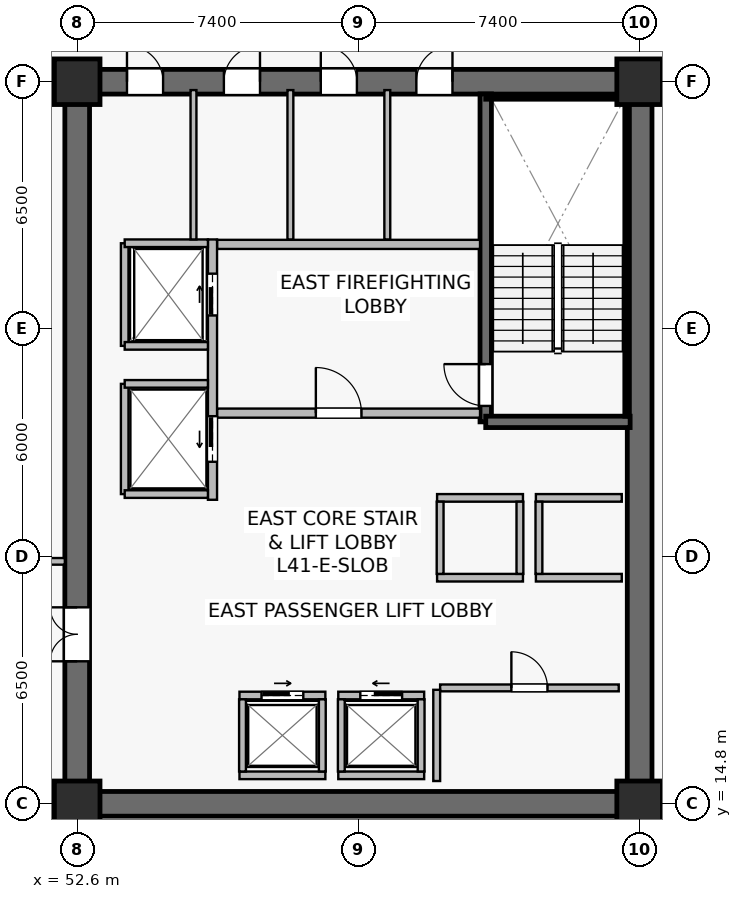
"""IFC4 building model, lengths in metres.
Left out: names, types, materials, properties, quantities, classifications, styles, units other than length and angle.
Written with IfcOpenShell. Run it as: python <this file> out.ifc"""

import sys

from ifc_helpers import new_model, si_unit, direction, frame, frame_2d, origin, origin_2d, place, context, subcontext, project, spatial, rectangle, extrude, source, transform, mapped, element, fill, save


model = new_model("IFC4")
c1 = context("Model", 3, precision=1e-05, world=origin(), true_north=direction((0.0, 1.0)))
c2 = subcontext(c1, "Body", "Model", "MODEL_VIEW")
j1 = project(units=[si_unit("LENGTHUNIT", "METRE"), si_unit("PLANEANGLEUNIT", "RADIAN")], contexts=[c1])
p1 = place(None, origin())
s1 = spatial("IfcSite", under=j1, at=p1, CompositionType="ELEMENT")
p2 = place(p1, origin())
s2 = spatial("IfcBuilding", under=s1, at=p2, CompositionType="ELEMENT")
p3 = place(p2, frame((0.0, 0.0, 170.7)))
s3 = spatial("IfcBuildingStorey", under=s2, at=p3, CompositionType="ELEMENT", Elevation=170.7)
p4 = place(p3, frame((52.275, 14.8, 0.0), z_axis=(0.0, 0.0, 1.0), x_axis=(1.0, 0.0, 0.0)))
e1 = element("IfcWall", 1, at=p4, inside=s3, PredefinedType="SHEAR", context=c2, shape_type="SweptSolid", body=[
    extrude(rectangle(XDim=15.45, YDim=0.65, at=frame_2d((7.725, 0.0))), origin(), (0.0, 0.0, 1.0), 3.79),
])
p5 = place(p3, frame((52.275, 33.8, 0.0), z_axis=(0.0, 0.0, 1.0), x_axis=(1.0, 0.0, 0.0)))
e2 = element("IfcWall", 2, at=p5, inside=s3, PredefinedType="SHEAR", context=c2, shape_type="SweptSolid", body=[
    extrude(rectangle(XDim=15.45, YDim=0.65, at=frame_2d((7.725, 0.0))), origin(), (0.0, 0.0, 1.0), 3.79),
])
p6 = place(p5, frame((9.25, 0.0, 0.0)))
e3 = element("IfcOpeningElement", 3, at=p6, cuts=e2, PredefinedType="OPENING", context=c2, shape_type="SweptSolid", body=[
    extrude(rectangle(XDim=0.95, YDim=2.15, at=frame_2d((0.475, 1.075))), frame((0.0, 0.335, 0.0), z_axis=(0.0, -1.0, 0.0), x_axis=(1.0, 0.0, 0.0)), (0.0, 0.0, 1.0), 0.67),
])
p7 = place(p5, frame((6.735, 0.0, 0.0)))
e4 = element("IfcOpeningElement", 4, at=p7, cuts=e2, PredefinedType="OPENING", context=c2, shape_type="SweptSolid", body=[
    extrude(rectangle(XDim=0.95, YDim=2.15, at=frame_2d((0.475, 1.075))), frame((0.0, 0.335, 0.0), z_axis=(0.0, -1.0, 0.0), x_axis=(1.0, 0.0, 0.0)), (0.0, 0.0, 1.0), 0.67),
])
p8 = place(p5, frame((4.185, 0.0, 0.0)))
e5 = element("IfcOpeningElement", 5, at=p8, cuts=e2, PredefinedType="OPENING", context=c2, shape_type="SweptSolid", body=[
    extrude(rectangle(XDim=0.95, YDim=2.15, at=frame_2d((0.475, 1.075))), frame((0.0, 0.335, 0.0), z_axis=(0.0, -1.0, 0.0), x_axis=(1.0, 0.0, 0.0)), (0.0, 0.0, 1.0), 0.67),
])
p9 = place(p5, frame((1.635, 0.0, 0.0)))
e6 = element("IfcOpeningElement", 6, at=p9, cuts=e2, PredefinedType="OPENING", context=c2, shape_type="SweptSolid", body=[
    extrude(rectangle(XDim=0.95, YDim=2.15, at=frame_2d((0.475, 1.075))), frame((0.0, 0.335, 0.0), z_axis=(0.0, -1.0, 0.0), x_axis=(1.0, 0.0, 0.0)), (0.0, 0.0, 1.0), 0.67),
])
p10 = place(p3, frame((52.6, 15.125, 0.0), z_axis=(0.0, 0.0, 1.0), x_axis=(0.0, 1.0, 0.0)))
e7 = element("IfcWall", 7, at=p10, inside=s3, PredefinedType="SHEAR", context=c2, shape_type="SweptSolid", body=[
    extrude(rectangle(XDim=18.35, YDim=0.65, at=frame_2d((9.175, 0.0))), origin(), (0.0, 0.0, 1.0), 3.79),
])
p11 = place(p10, frame((3.425, 0.0, 0.0)))
e8 = element("IfcOpeningElement", 8, at=p11, cuts=e7, PredefinedType="OPENING", context=c2, shape_type="SweptSolid", body=[
    extrude(rectangle(XDim=1.42, YDim=2.2, at=frame_2d((0.71, 1.1))), frame((0.0, 0.335, 0.0), z_axis=(0.0, -1.0, 0.0), x_axis=(1.0, 0.0, 0.0)), (0.0, 0.0, 1.0), 0.67),
])
p12 = place(p3, frame((67.4, 15.125, 0.0), z_axis=(0.0, 0.0, 1.0), x_axis=(0.0, 1.0, 0.0)))
e9 = element("IfcWall", 9, at=p12, inside=s3, PredefinedType="SHEAR", context=c2, shape_type="SweptSolid", body=[
    extrude(rectangle(XDim=18.35, YDim=0.65, at=frame_2d((9.175, 0.0))), origin(), (0.0, 0.0, 1.0), 3.79),
])
p13 = place(p3, frame((63.35, 24.85, 0.0), z_axis=(0.0, 0.0, 1.0), x_axis=(0.0, 1.0, 0.0)))
e10 = element("IfcWall", 10, at=p13, inside=s3, PredefinedType="SHEAR", context=c2, shape_type="SweptSolid", body=[
    extrude(rectangle(XDim=8.63, YDim=0.3, at=frame_2d((4.315, 0.0))), origin(), (0.0, 0.0, 1.0), 3.79),
])
p14 = place(p13, frame((0.42, 0.0, 0.0)))
e11 = element("IfcOpeningElement", 11, at=p14, cuts=e10, PredefinedType="OPENING", context=c2, shape_type="SweptSolid", body=[
    extrude(rectangle(XDim=1.1, YDim=2.15, at=frame_2d((0.55, 1.075))), frame((0.0, 0.16, 0.0), z_axis=(0.0, -1.0, 0.0), x_axis=(1.0, 0.0, 0.0)), (0.0, 0.0, 1.0), 0.32),
])
p15 = place(p3, frame((63.35, 24.85, 0.0), z_axis=(0.0, 0.0, 1.0), x_axis=(1.0, 0.0, 0.0)))
e12 = element("IfcWall", 12, at=p15, inside=s3, PredefinedType="SHEAR", context=c2, shape_type="SweptSolid", body=[
    extrude(rectangle(XDim=3.8, YDim=0.3, at=frame_2d((1.9, 0.0))), origin(), (0.0, 0.0, 1.0), 3.79),
])
p16 = place(p3, frame((63.35, 33.4, 0.0), z_axis=(0.0, 0.0, 1.0), x_axis=(1.0, 0.0, 0.0)))
e13 = element("IfcWall", 13, at=p16, inside=s3, PredefinedType="SOLIDWALL", context=c2, shape_type="SweptSolid", body=[
    extrude(rectangle(XDim=3.72, YDim=0.12, at=frame_2d((1.86, 0.0))), origin(), (0.0, 0.0, 1.0), 3.79),
])
p17 = place(p3, frame((67.07, 25.0, 0.0), z_axis=(0.0, 0.0, 1.0), x_axis=(0.0, 1.0, 0.0)))
e14 = element("IfcWall", 14, at=p17, inside=s3, PredefinedType="SOLIDWALL", context=c2, shape_type="SweptSolid", body=[
    extrude(rectangle(XDim=8.32, YDim=0.12, at=frame_2d((4.16, 0.0))), origin(), (0.0, 0.0, 1.0), 3.79),
])
m1 = source(origin(), c2, "Body", "SweptSolid", [
    extrude(rectangle(XDim=1.2, YDim=1.2, at=origin_2d()), origin(), (0.0, 0.0, 1.0), 4.1),
])
for number, where, z_axis, x_axis in (
    (15, (52.6, 14.8, 0.0), (0.0, 0.0, 1.0), (1.0, 0.0, 0.0)),
    (16, (67.4, 14.8, 0.0), (0.0, 0.0, 1.0), (1.0, 0.0, 0.0)),
    (17, (52.6, 33.8, 0.0), (0.0, 0.0, 1.0), (1.0, 0.0, 0.0)),
    (18, (67.4, 33.8, 0.0), (0.0, 0.0, 1.0), (1.0, 0.0, 0.0)),
):
    element("IfcColumn", number, at=place(p3, frame(where, z_axis=z_axis, x_axis=x_axis)), inside=s3, PredefinedType="COLUMN", context=c2, shape_type="MappedRepresentation", body=[
        mapped(m1, transform((0.0, 0.0, 0.0), scale=1.0)),
    ])
p18 = place(p3, frame((56.28, 25.08, 0.0), z_axis=(0.0, 0.0, 1.0), x_axis=(1.0, 0.0, 0.0)))
e19 = element("IfcWall", 19, at=p18, inside=s3, PredefinedType="SOLIDWALL", context=c2, shape_type="SweptSolid", body=[
    extrude(rectangle(XDim=6.92, YDim=0.24, at=frame_2d((3.46, 0.0))), origin(), (0.0, 0.0, 1.0), 3.187),
])
p19 = place(p18, frame((2.6, 0.0, 0.0)))
e20 = element("IfcOpeningElement", 20, at=p19, cuts=e19, PredefinedType="OPENING", context=c2, shape_type="SweptSolid", body=[
    extrude(rectangle(XDim=1.2, YDim=2.16, at=frame_2d((0.6, 1.08))), frame((0.0, 0.13, 0.0), z_axis=(0.0, -1.0, 0.0), x_axis=(1.0, 0.0, 0.0)), (0.0, 0.0, 1.0), 0.26),
])
p20 = place(p3, frame((56.28, 29.52, 0.0), z_axis=(0.0, 0.0, 1.0), x_axis=(1.0, 0.0, 0.0)))
e21 = element("IfcWall", 21, at=p20, inside=s3, PredefinedType="SOLIDWALL", context=c2, shape_type="SweptSolid", body=[
    extrude(rectangle(XDim=6.92, YDim=0.24, at=frame_2d((3.46, 0.0))), origin(), (0.0, 0.0, 1.0), 3.187),
])
p21 = place(p3, frame((56.16, 22.8, 0.0), z_axis=(0.0, 0.0, 1.0), x_axis=(0.0, 1.0, 0.0)))
e22 = element("IfcWall", 22, at=p21, inside=s3, PredefinedType="SOLIDWALL", context=c2, shape_type="SweptSolid", body=[
    extrude(rectangle(XDim=6.85, YDim=0.24, at=frame_2d((3.425, 0.0))), origin(), (0.0, 0.0, 1.0), 2.925),
])
p22 = place(p21, frame((4.85, 0.0, 0.0)))
e23 = element("IfcOpeningElement", 23, at=p22, cuts=e22, PredefinedType="OPENING", context=c2, shape_type="SweptSolid", body=[
    extrude(rectangle(XDim=1.1, YDim=2.22, at=frame_2d((0.55, 1.11))), frame((0.0, 0.13, 0.0), z_axis=(0.0, -1.0, 0.0), x_axis=(1.0, 0.0, 0.0)), (0.0, 0.0, 1.0), 0.26),
])
p23 = place(p21, frame((1.0, 0.0, 0.0)))
e24 = element("IfcOpeningElement", 24, at=p23, cuts=e22, PredefinedType="OPENING", context=c2, shape_type="SweptSolid", body=[
    extrude(rectangle(XDim=1.2, YDim=2.22, at=frame_2d((0.6, 1.11))), frame((0.0, 0.13, 0.0), z_axis=(0.0, -1.0, 0.0), x_axis=(1.0, 0.0, 0.0)), (0.0, 0.0, 1.0), 0.26),
])
p24 = place(p3, frame((59.47, 17.65, 0.0), z_axis=(0.0, 0.0, 1.0), x_axis=(1.0, 0.0, 0.0)))
e25 = element("IfcWall", 25, at=p24, inside=s3, PredefinedType="SOLIDWALL", context=c2, shape_type="SweptSolid", body=[
    extrude(rectangle(XDim=2.26, YDim=0.2, at=frame_2d((1.13, 0.0))), origin(), (0.0, 0.0, 1.0), 3.187),
])
p25 = place(p24, frame((0.58, 0.0, 0.0)))
e26 = element("IfcOpeningElement", 26, at=p25, cuts=e25, PredefinedType="OPENING", context=c2, shape_type="SweptSolid", body=[
    extrude(rectangle(XDim=1.1, YDim=2.22, at=frame_2d((0.55, 1.11))), frame((0.0, 0.11, 0.0), z_axis=(0.0, -1.0, 0.0), x_axis=(1.0, 0.0, 0.0)), (0.0, 0.0, 1.0), 0.22),
])
p26 = place(p3, frame((59.47, 15.55, 0.0), z_axis=(0.0, 0.0, 1.0), x_axis=(1.0, 0.0, 0.0)))
e27 = element("IfcWall", 27, at=p26, inside=s3, PredefinedType="SOLIDWALL", context=c2, shape_type="SweptSolid", body=[
    extrude(rectangle(XDim=2.26, YDim=0.2, at=frame_2d((1.13, 0.0))), origin(), (0.0, 0.0, 1.0), 3.187),
])
for number, where, z_axis, x_axis in (
    (28, (59.55, 15.65, 0.0), (0.0, 0.0, 1.0), (0.0, 1.0, 0.0)),
    (29, (61.65, 15.65, 0.0), (0.0, 0.0, 1.0), (0.0, 1.0, 0.0)),
):
    element("IfcWall", number, at=place(p3, frame(where, z_axis=z_axis, x_axis=x_axis)), inside=s3, PredefinedType="SOLIDWALL", context=c2, shape_type="SweptSolid", body=[
        extrude(rectangle(XDim=1.9, YDim=0.18, at=frame_2d((0.95, 0.0))), origin(), (0.0, 0.0, 1.0), 3.79),
    ])
p27 = place(p3, frame((56.87, 17.65, 0.0), z_axis=(0.0, 0.0, 1.0), x_axis=(1.0, 0.0, 0.0)))
e30 = element("IfcWall", 30, at=p27, inside=s3, PredefinedType="SOLIDWALL", context=c2, shape_type="SweptSolid", body=[
    extrude(rectangle(XDim=2.26, YDim=0.2, at=frame_2d((1.13, 0.0))), origin(), (0.0, 0.0, 1.0), 3.79),
])
p28 = place(p27, frame((0.58, 0.0, 0.0)))
e31 = element("IfcOpeningElement", 31, at=p28, cuts=e30, PredefinedType="OPENING", context=c2, shape_type="SweptSolid", body=[
    extrude(rectangle(XDim=1.1, YDim=2.22, at=frame_2d((0.55, 1.11))), frame((0.0, 0.11, 0.0), z_axis=(0.0, -1.0, 0.0), x_axis=(1.0, 0.0, 0.0)), (0.0, 0.0, 1.0), 0.22),
])
p29 = place(p3, frame((56.87, 15.55, 0.0), z_axis=(0.0, 0.0, 1.0), x_axis=(1.0, 0.0, 0.0)))
e32 = element("IfcWall", 32, at=p29, inside=s3, PredefinedType="SOLIDWALL", context=c2, shape_type="SweptSolid", body=[
    extrude(rectangle(XDim=2.26, YDim=0.2, at=frame_2d((1.13, 0.0))), origin(), (0.0, 0.0, 1.0), 3.79),
])
for number, where, z_axis, x_axis in (
    (33, (56.95, 15.65, 0.0), (0.0, 0.0, 1.0), (0.0, 1.0, 0.0)),
    (34, (59.05, 15.65, 0.0), (0.0, 0.0, 1.0), (0.0, 1.0, 0.0)),
):
    element("IfcWall", number, at=place(p3, frame(where, z_axis=z_axis, x_axis=x_axis)), inside=s3, PredefinedType="SOLIDWALL", context=c2, shape_type="SweptSolid", body=[
        extrude(rectangle(XDim=1.9, YDim=0.18, at=frame_2d((0.95, 0.0))), origin(), (0.0, 0.0, 1.0), 3.79),
    ])
for number, where, z_axis, x_axis in (
    (35, (64.67, 20.75, 0.0), (0.0, 0.0, 1.0), (1.0, 0.0, 0.0)),
    (36, (64.67, 22.85, 0.0), (0.0, 0.0, 1.0), (1.0, 0.0, 0.0)),
):
    element("IfcWall", number, at=place(p3, frame(where, z_axis=z_axis, x_axis=x_axis)), inside=s3, PredefinedType="SOLIDWALL", context=c2, shape_type="SweptSolid", body=[
        extrude(rectangle(XDim=2.26, YDim=0.2, at=frame_2d((1.13, 0.0))), origin(), (0.0, 0.0, 1.0), 3.79),
    ])
p30 = place(p3, frame((64.75, 20.85, 0.0), z_axis=(0.0, 0.0, 1.0), x_axis=(0.0, 1.0, 0.0)))
e37 = element("IfcWall", 37, at=p30, inside=s3, PredefinedType="SOLIDWALL", context=c2, shape_type="SweptSolid", body=[
    extrude(rectangle(XDim=1.9, YDim=0.18, at=frame_2d((0.95, 0.0))), origin(), (0.0, 0.0, 1.0), 3.79),
])
for number, where, z_axis, x_axis in (
    (38, (62.07, 20.75, 0.0), (0.0, 0.0, 1.0), (1.0, 0.0, 0.0)),
    (39, (62.07, 22.85, 0.0), (0.0, 0.0, 1.0), (1.0, 0.0, 0.0)),
):
    element("IfcWall", number, at=place(p3, frame(where, z_axis=z_axis, x_axis=x_axis)), inside=s3, PredefinedType="SOLIDWALL", context=c2, shape_type="SweptSolid", body=[
        extrude(rectangle(XDim=2.26, YDim=0.2, at=frame_2d((1.13, 0.0))), origin(), (0.0, 0.0, 1.0), 3.79),
    ])
for number, where, z_axis, x_axis in (
    (40, (62.15, 20.85, 0.0), (0.0, 0.0, 1.0), (0.0, 1.0, 0.0)),
    (41, (64.25, 20.85, 0.0), (0.0, 0.0, 1.0), (0.0, 1.0, 0.0)),
):
    element("IfcWall", number, at=place(p3, frame(where, z_axis=z_axis, x_axis=x_axis)), inside=s3, PredefinedType="SOLIDWALL", context=c2, shape_type="SweptSolid", body=[
        extrude(rectangle(XDim=1.9, YDim=0.18, at=frame_2d((0.95, 0.0))), origin(), (0.0, 0.0, 1.0), 3.79),
    ])
p31 = place(p3, frame((53.85, 26.85, 0.0), z_axis=(0.0, 0.0, 1.0), x_axis=(0.0, 1.0, 0.0)))
e42 = element("IfcWall", 42, at=p31, inside=s3, PredefinedType="SOLIDWALL", context=c2, shape_type="SweptSolid", body=[
    extrude(rectangle(XDim=2.7, YDim=0.2, at=frame_2d((1.35, 0.0))), origin(), (0.0, 0.0, 1.0), 3.79),
])
p32 = place(p3, frame((53.85, 29.55, 0.0), z_axis=(0.0, 0.0, 1.0), x_axis=(1.0, 0.0, 0.0)))
e43 = element("IfcWall", 43, at=p32, inside=s3, PredefinedType="SOLIDWALL", context=c2, shape_type="SweptSolid", body=[
    extrude(rectangle(XDim=2.19, YDim=0.2, at=frame_2d((1.095, 0.0))), origin(), (0.0, 0.0, 1.0), 3.79),
])
p33 = place(p3, frame((53.85, 26.85, 0.0), z_axis=(0.0, 0.0, 1.0), x_axis=(1.0, 0.0, 0.0)))
e44 = element("IfcWall", 44, at=p33, inside=s3, PredefinedType="SOLIDWALL", context=c2, shape_type="SweptSolid", body=[
    extrude(rectangle(XDim=2.19, YDim=0.2, at=frame_2d((1.095, 0.0))), origin(), (0.0, 0.0, 1.0), 3.187),
])
p34 = place(p3, frame((53.85, 22.95, 0.0), z_axis=(0.0, 0.0, 1.0), x_axis=(0.0, 1.0, 0.0)))
e45 = element("IfcWall", 45, at=p34, inside=s3, PredefinedType="SOLIDWALL", context=c2, shape_type="SweptSolid", body=[
    extrude(rectangle(XDim=2.9, YDim=0.2, at=frame_2d((1.45, 0.0))), origin(), (0.0, 0.0, 1.0), 2.925),
])
for number, where, z_axis, x_axis in (
    (46, (53.85, 25.85, 0.0), (0.0, 0.0, 1.0), (1.0, 0.0, 0.0)),
    (47, (53.85, 22.95, 0.0), (0.0, 0.0, 1.0), (1.0, 0.0, 0.0)),
):
    element("IfcWall", number, at=place(p3, frame(where, z_axis=z_axis, x_axis=x_axis)), inside=s3, PredefinedType="SOLIDWALL", context=c2, shape_type="SweptSolid", body=[
        extrude(rectangle(XDim=2.19, YDim=0.2, at=frame_2d((1.095, 0.0))), origin(), (0.0, 0.0, 1.0), 3.79),
    ])
p35 = place(p3, frame((62.15, 17.85, 0.0), z_axis=(0.0, 0.0, 1.0), x_axis=(1.0, 0.0, 0.0)))
e48 = element("IfcWall", 48, at=p35, inside=s3, PredefinedType="SOLIDWALL", context=c2, shape_type="SweptSolid", body=[
    extrude(rectangle(XDim=4.7, YDim=0.18, at=frame_2d((2.35, 0.0))), origin(), (0.0, 0.0, 1.0), 3.79),
])
p36 = place(p35, frame((1.875, 0.0, 0.0)))
e49 = element("IfcOpeningElement", 49, at=p36, cuts=e48, PredefinedType="OPENING", context=c2, shape_type="SweptSolid", body=[
    extrude(rectangle(XDim=0.95, YDim=2.15, at=frame_2d((0.475, 1.075))), frame((0.0, 0.1, 0.0), z_axis=(0.0, -1.0, 0.0), x_axis=(1.0, 0.0, 0.0)), (0.0, 0.0, 1.0), 0.2),
])
p37 = place(p3, frame((62.06, 15.4, 0.0), z_axis=(0.0, 0.0, 1.0), x_axis=(0.0, 1.0, 0.0)))
e50 = element("IfcWall", 50, at=p37, inside=s3, PredefinedType="SOLIDWALL", context=c2, shape_type="SweptSolid", body=[
    extrude(rectangle(XDim=2.4, YDim=0.18, at=frame_2d((1.2, 0.0))), origin(), (0.0, 0.0, 1.0), 3.79),
])
for number, where, z_axis, x_axis in (
    (51, (60.76, 29.65, 0.0), (0.0, 0.0, 1.0), (0.0, 1.0, 0.0)),
    (52, (58.21, 29.65, 0.0), (0.0, 0.0, 1.0), (0.0, 1.0, 0.0)),
    (53, (55.66, 29.65, 0.0), (0.0, 0.0, 1.0), (0.0, 1.0, 0.0)),
):
    element("IfcWall", number, at=place(p3, frame(where, z_axis=z_axis, x_axis=x_axis)), inside=s3, PredefinedType="PLUMBINGWALL", context=c2, shape_type="SweptSolid", body=[
        extrude(rectangle(XDim=3.93, YDim=0.155, at=frame_2d((1.965, 0.0))), origin(), (0.0, 0.0, 1.0), 3.79),
    ])
p38 = place(p3, frame((48.3, 34.26, 0.0), z_axis=(0.0, 0.0, 1.0), x_axis=(1.0, 0.0, 0.0)))
e54 = element("IfcWall", 54, at=p38, inside=s3, PredefinedType="PARTITIONING", context=c2, shape_type="SweptSolid", body=[
    extrude(rectangle(XDim=3.975, YDim=0.175, at=frame_2d((1.987, 0.0))), origin(), (0.0, 0.0, 1.0), 3.475),
])
p39 = place(p3, frame((48.3, 21.18, 0.0), z_axis=(0.0, 0.0, 1.0), x_axis=(1.0, 0.0, 0.0)))
e55 = element("IfcWall", 55, at=p39, inside=s3, PredefinedType="PARTITIONING", context=c2, shape_type="SweptSolid", body=[
    extrude(rectangle(XDim=3.975, YDim=0.175, at=frame_2d((1.987, 0.0))), origin(), (0.0, 0.0, 1.0), 3.79),
])
p40 = place(p39, frame((1.35, 0.0, 0.0)))
e56 = element("IfcOpeningElement", 56, at=p40, cuts=e55, PredefinedType="OPENING", context=c2, shape_type="SweptSolid", body=[
    extrude(rectangle(XDim=0.95, YDim=2.15, at=frame_2d((0.475, 1.075))), frame((0.0, 0.098, 0.0), z_axis=(0.0, -1.0, 0.0), x_axis=(1.0, 0.0, 0.0)), (0.0, 0.0, 1.0), 0.195),
])
m2 = source(origin(), c2, "Body", "SweptSolid", [
    extrude(rectangle(XDim=1.1, YDim=2.15, at=frame_2d((0.55, 1.075))), frame((0.0, 0.025, 0.0), z_axis=(0.0, -1.0, 0.0), x_axis=(1.0, 0.0, 0.0)), (0.0, 0.0, 1.0), 0.05),
])
p41 = place(p14, origin())
e57 = element("IfcDoor", 57, at=p41, inside=s3, OperationType="SINGLE_SWING_RIGHT", PredefinedType="DOOR", context=c2, shape_type="MappedRepresentation", body=[
    mapped(m2, transform((0.0, 0.0, 0.0), scale=1.0)),
])
fill(e11, e57)
m3 = source(origin(), c2, "Body", "SweptSolid", [
    extrude(rectangle(XDim=1.2, YDim=2.16, at=frame_2d((0.6, 1.08))), frame((0.0, 0.025, 0.0), z_axis=(0.0, -1.0, 0.0), x_axis=(1.0, 0.0, 0.0)), (0.0, 0.0, 1.0), 0.05),
])
p42 = place(p19, origin())
e58 = element("IfcDoor", 58, at=p42, inside=s3, OperationType="SINGLE_SWING_LEFT", PredefinedType="DOOR", context=c2, shape_type="MappedRepresentation", body=[
    mapped(m3, transform((0.0, 0.0, 0.0), scale=1.0)),
])
fill(e20, e58)
m4 = source(origin(), c2, "Body", "SweptSolid", [
    extrude(rectangle(XDim=1.1, YDim=2.22, at=frame_2d((0.55, 1.11))), frame((0.0, 0.025, 0.0), z_axis=(0.0, -1.0, 0.0), x_axis=(1.0, 0.0, 0.0)), (0.0, 0.0, 1.0), 0.05),
])
p43 = place(p25, origin())
e59 = element("IfcDoor", 59, at=p43, inside=s3, OperationType="SLIDING_TO_LEFT", PredefinedType="USERDEFINED", context=c2, shape_type="MappedRepresentation", body=[
    mapped(m4, transform((0.0, 0.0, 0.0), scale=1.0)),
])
fill(e26, e59)
p44 = place(p28, origin())
e60 = element("IfcDoor", 60, at=p44, inside=s3, OperationType="SLIDING_TO_RIGHT", PredefinedType="USERDEFINED", context=c2, shape_type="MappedRepresentation", body=[
    mapped(m4, transform((0.0, 0.0, 0.0), scale=1.0)),
])
fill(e31, e60)
p45 = place(p22, origin())
e61 = element("IfcDoor", 61, at=p45, inside=s3, OperationType="SLIDING_TO_RIGHT", PredefinedType="USERDEFINED", context=c2, shape_type="MappedRepresentation", body=[
    mapped(m4, transform((0.0, 0.0, 0.0), scale=1.0)),
])
fill(e23, e61)
m5 = source(origin(), c2, "Body", "SweptSolid", [
    extrude(rectangle(XDim=1.2, YDim=2.22, at=frame_2d((0.6, 1.11))), frame((0.0, 0.025, 0.0), z_axis=(0.0, -1.0, 0.0), x_axis=(1.0, 0.0, 0.0)), (0.0, 0.0, 1.0), 0.05),
])
p46 = place(p23, origin())
e62 = element("IfcDoor", 62, at=p46, inside=s3, OperationType="SLIDING_TO_LEFT", PredefinedType="USERDEFINED", context=c2, shape_type="MappedRepresentation", body=[
    mapped(m5, transform((0.0, 0.0, 0.0), scale=1.0)),
])
fill(e24, e62)
m6 = source(origin(), c2, "Body", "SweptSolid", [
    extrude(rectangle(XDim=0.95, YDim=2.15, at=frame_2d((0.475, 1.075))), frame((0.0, 0.025, 0.0), z_axis=(0.0, -1.0, 0.0), x_axis=(1.0, 0.0, 0.0)), (0.0, 0.0, 1.0), 0.05),
])
p47 = place(p36, origin())
e63 = element("IfcDoor", 63, at=p47, inside=s3, OperationType="SINGLE_SWING_LEFT", PredefinedType="DOOR", context=c2, shape_type="MappedRepresentation", body=[
    mapped(m6, transform((0.0, 0.0, 0.0), scale=1.0)),
])
fill(e49, e63)
m7 = source(origin(), c2, "Body", "SweptSolid", [
    extrude(rectangle(XDim=1.42, YDim=2.2, at=frame_2d((0.71, 1.1))), frame((0.0, 0.025, 0.0), z_axis=(0.0, -1.0, 0.0), x_axis=(1.0, 0.0, 0.0)), (0.0, 0.0, 1.0), 0.05),
])
p48 = place(p11, origin())
e64 = element("IfcDoor", 64, at=p48, inside=s3, OperationType="DOUBLE_DOOR_SINGLE_SWING", PredefinedType="DOOR", context=c2, shape_type="MappedRepresentation", body=[
    mapped(m7, transform((0.0, 0.0, 0.0), scale=1.0)),
])
fill(e8, e64)
p49 = place(p6, origin())
e65 = element("IfcDoor", 65, at=p49, inside=s3, OperationType="SINGLE_SWING_RIGHT", PredefinedType="DOOR", context=c2, shape_type="MappedRepresentation", body=[
    mapped(m6, transform((0.0, 0.0, 0.0), scale=1.0)),
])
fill(e3, e65)
p50 = place(p7, origin())
e66 = element("IfcDoor", 66, at=p50, inside=s3, OperationType="SINGLE_SWING_LEFT", PredefinedType="DOOR", context=c2, shape_type="MappedRepresentation", body=[
    mapped(m6, transform((0.0, 0.0, 0.0), scale=1.0)),
])
fill(e4, e66)
p51 = place(p8, origin())
e67 = element("IfcDoor", 67, at=p51, inside=s3, OperationType="SINGLE_SWING_RIGHT", PredefinedType="DOOR", context=c2, shape_type="MappedRepresentation", body=[
    mapped(m6, transform((0.0, 0.0, 0.0), scale=1.0)),
])
fill(e5, e67)
p52 = place(p9, origin())
e68 = element("IfcDoor", 68, at=p52, inside=s3, OperationType="SINGLE_SWING_LEFT", PredefinedType="DOOR", context=c2, shape_type="MappedRepresentation", body=[
    mapped(m6, transform((0.0, 0.0, 0.0), scale=1.0)),
])
fill(e6, e68)
save(model, sys.argv[1])
